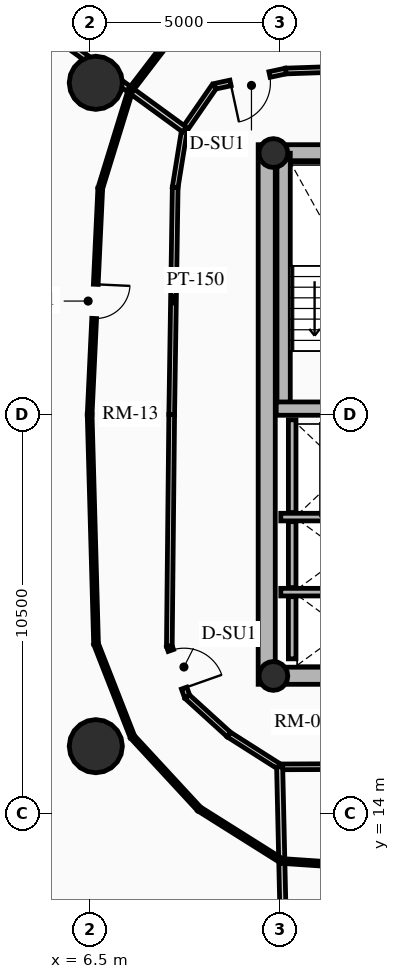
"""IFC4 building model, lengths in metres.
Left out: names, types, materials, properties, quantities, classifications, styles, units other than length and angle.
Written with IfcOpenShell. Run it as: python <this file> out.ifc"""

import sys

from ifc_helpers import new_model, si_unit, direction, frame, frame_2d, origin, origin_2d, place, context, subcontext, project, spatial, rectangle, circle, hollow_circle, extrude, source, transform, mapped, element, fill, save


model = new_model("IFC4")
c1 = context("Model", 3, precision=1e-05, world=origin(), true_north=direction((0.0, 1.0)))
c2 = subcontext(c1, "Body", "Model", "MODEL_VIEW")
j1 = project(units=[si_unit("LENGTHUNIT", "METRE"), si_unit("PLANEANGLEUNIT", "RADIAN")], contexts=[c1])
p1 = place(None, origin())
s1 = spatial("IfcSite", under=j1, at=p1, CompositionType="ELEMENT")
p2 = place(p1, origin())
s2 = spatial("IfcBuilding", under=s1, at=p2, CompositionType="ELEMENT")
p3 = place(p2, frame((0.0, 0.0, 93.43)))
s3 = spatial("IfcBuildingStorey", under=s2, at=p3, CompositionType="ELEMENT", Elevation=93.43)
p4 = place(p3, frame((11.15, 17.4, 0.0), z_axis=(0.0, 0.0, 1.0), x_axis=(0.0, 1.0, 0.0)))
e1 = element("IfcWall", 1, at=p4, inside=s3, PredefinedType="SHEAR", context=c2, shape_type="SweptSolid", body=[
    extrude(rectangle(XDim=14.2, YDim=0.45, at=frame_2d((7.1, 0.0))), origin(), (0.0, 0.0, 1.0), 2.91),
])
p5 = place(p3, frame((11.15, 17.625, 0.0), z_axis=(0.0, 0.0, 1.0), x_axis=(1.0, 0.0, 0.0)))
e2 = element("IfcWall", 2, at=p5, inside=s3, PredefinedType="SHEAR", context=c2, shape_type="SweptSolid", body=[
    extrude(rectangle(XDim=10.7, YDim=0.45, at=frame_2d((5.35, 0.0))), origin(), (0.0, 0.0, 1.0), 2.91),
])
m1 = source(origin(), c2, "Body", "SweptSolid", [
    extrude(rectangle(XDim=1.5, YDim=2.02, at=frame_2d((0.75, 1.01))), frame((0.0, 0.235, 0.0), z_axis=(0.0, -1.0, 0.0), x_axis=(1.0, 0.0, 0.0)), (0.0, 0.0, 1.0), 0.47),
])
p6 = place(p5, frame((5.45, 0.0, 0.0)))
e3 = element("IfcOpeningElement", 3, at=p6, cuts=e2, PredefinedType="OPENING", context=c2, shape_type="MappedRepresentation", body=[
    mapped(m1, transform((0.0, 0.0, 0.0), x_axis=(1.0, 0.0, 0.0), y_axis=(0.0, 1.0, 0.0), z_axis=(0.0, 0.0, 1.0), scale=1.0)),
])
p7 = place(p3, frame((11.15, 31.375, 0.0), z_axis=(0.0, 0.0, 1.0), x_axis=(1.0, 0.0, 0.0)))
e4 = element("IfcWall", 4, at=p7, inside=s3, PredefinedType="SHEAR", context=c2, shape_type="SweptSolid", body=[
    extrude(rectangle(XDim=10.7, YDim=0.45, at=frame_2d((5.35, 0.0))), origin(), (0.0, 0.0, 1.0), 2.91),
])
p8 = place(p7, frame((4.6, 0.0, 0.0)))
e5 = element("IfcOpeningElement", 5, at=p8, cuts=e4, PredefinedType="OPENING", context=c2, shape_type="MappedRepresentation", body=[
    mapped(m1, transform((0.0, 0.0, 0.0), x_axis=(1.0, 0.0, 0.0), y_axis=(0.0, 1.0, 0.0), z_axis=(0.0, 0.0, 1.0), scale=1.0)),
])
p9 = place(p3, frame((11.595, 24.655, 0.0), z_axis=(0.0, 0.0, 1.0), x_axis=(0.0, 1.0, 0.0)))
e6 = element("IfcWall", 6, at=p9, inside=s3, PredefinedType="SHEAR", context=c2, shape_type="SweptSolid", body=[
    extrude(rectangle(XDim=6.72, YDim=0.35, at=frame_2d((3.36, 0.0))), origin(), (0.0, 0.0, 1.0), 2.91),
])
p10 = place(p3, frame((11.4, 24.655, 0.0), z_axis=(0.0, 0.0, 1.0), x_axis=(1.0, 0.0, 0.0)))
e7 = element("IfcWall", 7, at=p10, inside=s3, PredefinedType="SHEAR", context=c2, shape_type="SweptSolid", body=[
    extrude(rectangle(XDim=3.285, YDim=0.35, at=frame_2d((1.643, 0.0))), origin(), (0.0, 0.0, 1.0), 2.91),
])
for number, where, z_axis, x_axis in (
    (8, (11.325, 17.62, 0.0), (0.0, 0.0, 1.0), (1.0, 0.0, 0.0)),
    (9, (11.325, 31.38, 0.0), (0.0, 0.0, 1.0), (1.0, 0.0, 0.0)),
):
    element("IfcColumn", number, at=place(p3, frame(where, z_axis=z_axis, x_axis=x_axis)), inside=s3, PredefinedType="COLUMN", context=c2, shape_type="SweptSolid", body=[
        extrude(hollow_circle(Radius=0.38, WallThickness=0.032, at=origin_2d()), origin(), (0.0, 0.0, 1.0), 2.91),
    ])
for number, where, z_axis, x_axis in (
    (10, (6.653, 33.229, 0.0), (0.0, 0.0, 1.0), (1.0, 0.0, 0.0)),
    (11, (6.653, 15.771, 0.0), (0.0, 0.0, 1.0), (1.0, 0.0, 0.0)),
):
    element("IfcColumn", number, at=place(p3, frame(where, z_axis=z_axis, x_axis=x_axis)), inside=s3, PredefinedType="USERDEFINED", context=c2, shape_type="SweptSolid", body=[
        extrude(circle(Radius=0.7, at=origin_2d()), origin(), (0.0, 0.0, 1.0), 2.91),
    ])
p11 = place(p3, frame((7.342, 9.072, 0.0), z_axis=(0.0, 0.0, 1.0), x_axis=(-0.632700781152, 0.77439635945, 0.0)))
e12 = element("IfcWall", 12, at=p11, inside=s3, PredefinedType="SOLIDWALL", context=c2, shape_type="SweptSolid", body=[
    extrude(rectangle(XDim=5.448, YDim=0.24, at=frame_2d((2.724, 0.0))), origin(), (0.0, 0.0, 1.0), 2.179),
])
p12 = place(p3, frame((11.52, 21.8, 0.0), z_axis=(0.0, 0.0, 1.0), x_axis=(1.0, 0.0, 0.0)))
e13 = element("IfcWall", 13, at=p12, inside=s3, PredefinedType="SHEAR", context=c2, shape_type="SweptSolid", body=[
    extrude(rectangle(XDim=2.97, YDim=0.2, at=frame_2d((1.485, 0.0))), origin(), (0.0, 0.0, 1.0), 2.91),
])
p13 = place(p3, frame((11.82, 21.92, 0.0), z_axis=(0.0, 0.0, 1.0), x_axis=(0.0, 1.0, 0.0)))
e14 = element("IfcWall", 14, at=p13, inside=s3, PredefinedType="SHEAR", context=c2, shape_type="SweptSolid", body=[
    extrude(rectangle(XDim=2.44, YDim=0.2, at=frame_2d((1.22, 0.0))), origin(), (0.0, 0.0, 1.0), 2.91),
])
p14 = place(p3, frame((11.52, 19.825, 0.0), z_axis=(0.0, 0.0, 1.0), x_axis=(1.0, 0.0, 0.0)))
e15 = element("IfcWall", 15, at=p14, inside=s3, PredefinedType="SHEAR", context=c2, shape_type="SweptSolid", body=[
    extrude(rectangle(XDim=2.97, YDim=0.2, at=frame_2d((1.485, 0.0))), origin(), (0.0, 0.0, 1.0), 2.91),
])
p15 = place(p3, frame((11.82, 19.945, 0.0), z_axis=(0.0, 0.0, 1.0), x_axis=(0.0, 1.0, 0.0)))
e16 = element("IfcWall", 16, at=p15, inside=s3, PredefinedType="SHEAR", context=c2, shape_type="SweptSolid", body=[
    extrude(rectangle(XDim=1.735, YDim=0.2, at=frame_2d((0.867, 0.0))), origin(), (0.0, 0.0, 1.0), 2.91),
])
p16 = place(p3, frame((11.82, 18.07, 0.0), z_axis=(0.0, 0.0, 1.0), x_axis=(0.0, 1.0, 0.0)))
e17 = element("IfcWall", 17, at=p16, inside=s3, PredefinedType="SHEAR", context=c2, shape_type="SweptSolid", body=[
    extrude(rectangle(XDim=1.635, YDim=0.2, at=frame_2d((0.817, 0.0))), origin(), (0.0, 0.0, 1.0), 2.91),
])
p17 = place(p3, frame((18.133, 33.76, 0.0), z_axis=(0.0, 0.0, 1.0), x_axis=(-0.999419643988, -0.034064280574, 0.0)))
e18 = element("IfcWall", 18, at=p17, inside=s3, PredefinedType="PARTITIONING", context=c2, shape_type="SweptSolid", body=[
    extrude(rectangle(XDim=6.486, YDim=0.15, at=frame_2d((3.243, 0.0))), origin(), (0.0, 0.0, 1.0), 2.225),
])
p18 = place(p3, frame((11.65, 33.539, 0.0), z_axis=(0.0, 0.0, 1.0), x_axis=(-0.977535921581, -0.210768882949, 0.0)))
e19 = element("IfcWall", 19, at=p18, inside=s3, PredefinedType="PARTITIONING", context=c2, shape_type="SweptSolid", body=[
    extrude(rectangle(XDim=1.923, YDim=0.15, at=frame_2d((0.961, 0.0))), origin(), (0.0, 0.0, 1.0), 2.225),
])
m2 = source(origin(), c2, "Body", "SweptSolid", [
    extrude(rectangle(XDim=1.05, YDim=2.015, at=frame_2d((0.525, 1.007))), frame((0.0, 0.085, 0.0), z_axis=(0.0, -1.0, 0.0), x_axis=(1.0, 0.0, 0.0)), (0.0, 0.0, 1.0), 0.17),
])
p19 = place(p18, frame((0.436, 0.0, 0.0)))
e20 = element("IfcOpeningElement", 20, at=p19, cuts=e19, PredefinedType="OPENING", context=c2, shape_type="MappedRepresentation", body=[
    mapped(m2, transform((0.0, 0.0, 0.0), x_axis=(1.0, 0.0, 0.0), y_axis=(0.0, 1.0, 0.0), z_axis=(0.0, 0.0, 1.0), scale=1.0)),
])
p20 = place(p3, frame((9.771, 33.133, 0.0), z_axis=(0.0, 0.0, 1.0), x_axis=(-0.568464531016, -0.822707771312, 0.0)))
e21 = element("IfcWall", 21, at=p20, inside=s3, PredefinedType="PARTITIONING", context=c2, shape_type="SweptSolid", body=[
    extrude(rectangle(XDim=1.38, YDim=0.15, at=frame_2d((0.69, 0.0))), origin(), (0.0, 0.0, 1.0), 2.225),
])
p21 = place(p3, frame((8.986, 31.998, 0.0), z_axis=(0.0, 0.0, 1.0), x_axis=(-0.158992972351, -0.98727971454, 0.0)))
e22 = element("IfcWall", 22, at=p21, inside=s3, PredefinedType="PARTITIONING", context=c2, shape_type="SweptSolid", body=[
    extrude(rectangle(XDim=1.539, YDim=0.15, at=frame_2d((0.769, 0.0))), origin(), (0.0, 0.0, 1.0), 2.225),
])
p22 = place(p3, frame((8.742, 30.479, 0.0), z_axis=(0.0, 0.0, 1.0), x_axis=(-0.015351396174, -0.999882160375, 0.0)))
e23 = element("IfcWall", 23, at=p22, inside=s3, PredefinedType="PARTITIONING", context=c2, shape_type="SweptSolid", body=[
    extrude(rectangle(XDim=5.98, YDim=0.15, at=frame_2d((2.99, 0.0))), origin(), (0.0, 0.0, 1.0), 2.655),
])
p23 = place(p3, frame((8.65, 24.5, 0.0), z_axis=(0.0, 0.0, 1.0), x_axis=(-0.010250943023, -0.999947457703, 0.0)))
e24 = element("IfcWall", 24, at=p23, inside=s3, PredefinedType="PARTITIONING", context=c2, shape_type="SweptSolid", body=[
    extrude(rectangle(XDim=6.097, YDim=0.15, at=frame_2d((3.048, 0.0))), origin(), (0.0, 0.0, 1.0), 2.225),
])
p24 = place(p3, frame((8.587, 18.403, 0.0), z_axis=(0.0, 0.0, 1.0), x_axis=(0.333119120686, -0.942884749815, 0.0)))
e25 = element("IfcWall", 25, at=p24, inside=s3, PredefinedType="PARTITIONING", context=c2, shape_type="SweptSolid", body=[
    extrude(rectangle(XDim=1.409, YDim=0.15, at=frame_2d((0.705, 0.0))), origin(), (0.0, 0.0, 1.0), 2.225),
])
p25 = place(p24, frame((0.12, 0.0, 0.0)))
e26 = element("IfcOpeningElement", 26, at=p25, cuts=e25, PredefinedType="OPENING", context=c2, shape_type="MappedRepresentation", body=[
    mapped(m2, transform((0.0, 0.0, 0.0), x_axis=(1.0, 0.0, 0.0), y_axis=(0.0, 1.0, 0.0), z_axis=(0.0, 0.0, 1.0), scale=1.0)),
])
p26 = place(p3, frame((9.057, 17.074, 0.0), z_axis=(0.0, 0.0, 1.0), x_axis=(0.739999571423, -0.672607340351, 0.0)))
e27 = element("IfcWall", 27, at=p26, inside=s3, PredefinedType="PARTITIONING", context=c2, shape_type="SweptSolid", body=[
    extrude(rectangle(XDim=1.485, YDim=0.15, at=frame_2d((0.743, 0.0))), origin(), (0.0, 0.0, 1.0), 2.225),
])
p27 = place(p3, frame((10.156, 16.075, 0.0), z_axis=(0.0, 0.0, 1.0), x_axis=(0.843896624713, -0.536505812455, 0.0)))
e28 = element("IfcWall", 28, at=p27, inside=s3, PredefinedType="PARTITIONING", context=c2, shape_type="SweptSolid", body=[
    extrude(rectangle(XDim=1.581, YDim=0.15, at=frame_2d((0.791, 0.0))), origin(), (0.0, 0.0, 1.0), 2.225),
])
p28 = place(p3, frame((11.49, 15.227, 0.0), z_axis=(0.0, 0.0, 1.0), x_axis=(0.999991728046, 0.004067411998, 0.0)))
e29 = element("IfcWall", 29, at=p28, inside=s3, PredefinedType="PARTITIONING", context=c2, shape_type="SweptSolid", body=[
    extrude(rectangle(XDim=3.301, YDim=0.15, at=frame_2d((1.651, 0.0))), origin(), (0.0, 0.0, 1.0), 2.225),
])
p29 = place(p3, frame((8.986, 31.998, 0.0), z_axis=(0.0, 0.0, 1.0), x_axis=(-0.808130498411, 0.589003478375, 0.0)))
e30 = element("IfcWall", 30, at=p29, inside=s3, PredefinedType="PARTITIONING", context=c2, shape_type="SweptSolid", body=[
    extrude(rectangle(XDim=6.281, YDim=0.16, at=frame_2d((3.14, 0.0))), origin(), (0.0, 0.0, 1.0), 2.179),
])
p30 = place(p3, frame((11.49, 15.227, 0.0), z_axis=(0.0, 0.0, 1.0), x_axis=(0.022711375682, -0.999742063442, 0.0)))
e31 = element("IfcWall", 31, at=p30, inside=s3, PredefinedType="PARTITIONING", context=c2, shape_type="SweptSolid", body=[
    extrude(rectangle(XDim=8.847, YDim=0.16, at=frame_2d((4.423, 0.0))), origin(), (0.0, 0.0, 1.0), 2.179),
])
p31 = place(p3, frame((9.094, 35.031, 0.0), z_axis=(0.0, 0.0, 1.0), x_axis=(-0.607813927368, -0.794079485755, 0.0)))
e32 = element("IfcWall", 32, at=p31, inside=s3, PredefinedType="PARTITIONING", context=c2, shape_type="SweptSolid", body=[
    extrude(rectangle(XDim=2.515, YDim=0.125, at=frame_2d((1.258, 0.0))), origin(), (0.0, 0.0, 1.0), 2.655),
])
p32 = place(p3, frame((7.565, 33.034, 0.0), z_axis=(0.0, 0.0, 1.0), x_axis=(-0.294365365095, -0.955692958974, 0.0)))
e33 = element("IfcWall", 33, at=p32, inside=s3, PredefinedType="PARTITIONING", context=c2, shape_type="SweptSolid", body=[
    extrude(rectangle(XDim=2.7, YDim=0.125, at=frame_2d((1.35, 0.0))), origin(), (0.0, 0.0, 1.0), 2.225),
])
p33 = place(p3, frame((6.77, 30.453, 0.0), z_axis=(0.0, 0.0, 1.0), x_axis=(-0.046864461883, -0.998901257489, 0.0)))
e34 = element("IfcWall", 34, at=p33, inside=s3, PredefinedType="PARTITIONING", context=c2, shape_type="SweptSolid", body=[
    extrude(rectangle(XDim=5.96, YDim=0.125, at=frame_2d((2.98, 0.0))), origin(), (0.0, 0.0, 1.0), 2.655),
])
m3 = source(origin(), c2, "Body", "SweptSolid", [
    extrude(rectangle(XDim=0.9, YDim=2.005, at=frame_2d((0.45, 1.002))), frame((0.0, 0.073, 0.0), z_axis=(0.0, -1.0, 0.0), x_axis=(1.0, 0.0, 0.0)), (0.0, 0.0, 1.0), 0.145),
])
p34 = place(p33, frame((2.53, 0.0, 0.0)))
e35 = element("IfcOpeningElement", 35, at=p34, cuts=e34, PredefinedType="OPENING", context=c2, shape_type="MappedRepresentation", body=[
    mapped(m3, transform((0.0, 0.0, 0.0), x_axis=(1.0, 0.0, 0.0), y_axis=(0.0, 1.0, 0.0), z_axis=(0.0, 0.0, 1.0), scale=1.0)),
])
p35 = place(p3, frame((6.491, 24.5, 0.0), z_axis=(0.0, 0.0, 1.0), x_axis=(0.027808577393, -0.99961326673, 0.0)))
e36 = element("IfcWall", 36, at=p35, inside=s3, PredefinedType="PARTITIONING", context=c2, shape_type="SweptSolid", body=[
    extrude(rectangle(XDim=6.04, YDim=0.125, at=frame_2d((3.02, 0.0))), origin(), (0.0, 0.0, 1.0), 2.225),
])
p36 = place(p3, frame((6.659, 18.462, 0.0), z_axis=(0.0, 0.0, 1.0), x_axis=(0.364644852064, -0.931146675805, 0.0)))
e37 = element("IfcWall", 37, at=p36, inside=s3, PredefinedType="PARTITIONING", context=c2, shape_type="SweptSolid", body=[
    extrude(rectangle(XDim=2.625, YDim=0.125, at=frame_2d((1.312, 0.0))), origin(), (0.0, 0.0, 1.0), 2.225),
])
p37 = place(p3, frame((7.616, 16.018, 0.0), z_axis=(0.0, 0.0, 1.0), x_axis=(0.67871125453, -0.734405223956, 0.0)))
e38 = element("IfcWall", 38, at=p37, inside=s3, PredefinedType="PARTITIONING", context=c2, shape_type="SweptSolid", body=[
    extrude(rectangle(XDim=2.586, YDim=0.125, at=frame_2d((1.293, 0.0))), origin(), (0.0, 0.0, 1.0), 2.655),
])
p38 = place(p3, frame((9.371, 14.119, 0.0), z_axis=(0.0, 0.0, 1.0), x_axis=(0.846446940893, -0.532473075613, 0.0)))
e39 = element("IfcWall", 39, at=p38, inside=s3, PredefinedType="PARTITIONING", context=c2, shape_type="SweptSolid", body=[
    extrude(rectangle(XDim=2.57, YDim=0.125, at=frame_2d((1.285, 0.0))), origin(), (0.0, 0.0, 1.0), 2.225),
])
p39 = place(p3, frame((11.547, 12.75, 0.0), z_axis=(0.0, 0.0, 1.0), x_axis=(0.997731575096, -0.067317932645, 0.0)))
e40 = element("IfcWall", 40, at=p39, inside=s3, PredefinedType="PARTITIONING", context=c2, shape_type="SweptSolid", body=[
    extrude(rectangle(XDim=3.732, YDim=0.125, at=frame_2d((1.866, 0.0))), origin(), (0.0, 0.0, 1.0), 2.225),
])
m4 = source(origin(), c2, "Body", "SweptSolid", [
    extrude(rectangle(XDim=1.05, YDim=2.015, at=frame_2d((0.525, 1.007))), frame((0.0, 0.025, 0.0), z_axis=(0.0, -1.0, 0.0), x_axis=(1.0, 0.0, 0.0)), (0.0, 0.0, 1.0), 0.05),
])
p40 = place(p19, origin())
e41 = element("IfcDoor", 41, at=p40, inside=s3, OperationType="SINGLE_SWING_RIGHT", PredefinedType="DOOR", context=c2, shape_type="MappedRepresentation", body=[
    mapped(m4, transform((0.0, 0.0, 0.0), x_axis=(1.0, 0.0, 0.0), y_axis=(0.0, 1.0, 0.0), z_axis=(0.0, 0.0, 1.0), scale=1.0)),
])
fill(e20, e41)
p41 = place(p25, origin())
e42 = element("IfcDoor", 42, at=p41, inside=s3, OperationType="SINGLE_SWING_RIGHT", PredefinedType="DOOR", context=c2, shape_type="MappedRepresentation", body=[
    mapped(m4, transform((0.0, 0.0, 0.0), x_axis=(1.0, 0.0, 0.0), y_axis=(0.0, 1.0, 0.0), z_axis=(0.0, 0.0, 1.0), scale=1.0)),
])
fill(e26, e42)
m5 = source(origin(), c2, "Body", "SweptSolid", [
    extrude(rectangle(XDim=0.9, YDim=2.005, at=frame_2d((0.45, 1.002))), frame((0.0, 0.025, 0.0), z_axis=(0.0, -1.0, 0.0), x_axis=(1.0, 0.0, 0.0)), (0.0, 0.0, 1.0), 0.05),
])
p42 = place(p34, origin())
e43 = element("IfcDoor", 43, at=p42, inside=s3, OperationType="SINGLE_SWING_LEFT", PredefinedType="DOOR", context=c2, shape_type="MappedRepresentation", body=[
    mapped(m5, transform((0.0, 0.0, 0.0), x_axis=(1.0, 0.0, 0.0), y_axis=(0.0, 1.0, 0.0), z_axis=(0.0, 0.0, 1.0), scale=1.0)),
])
fill(e35, e43)
save(model, sys.argv[1])
